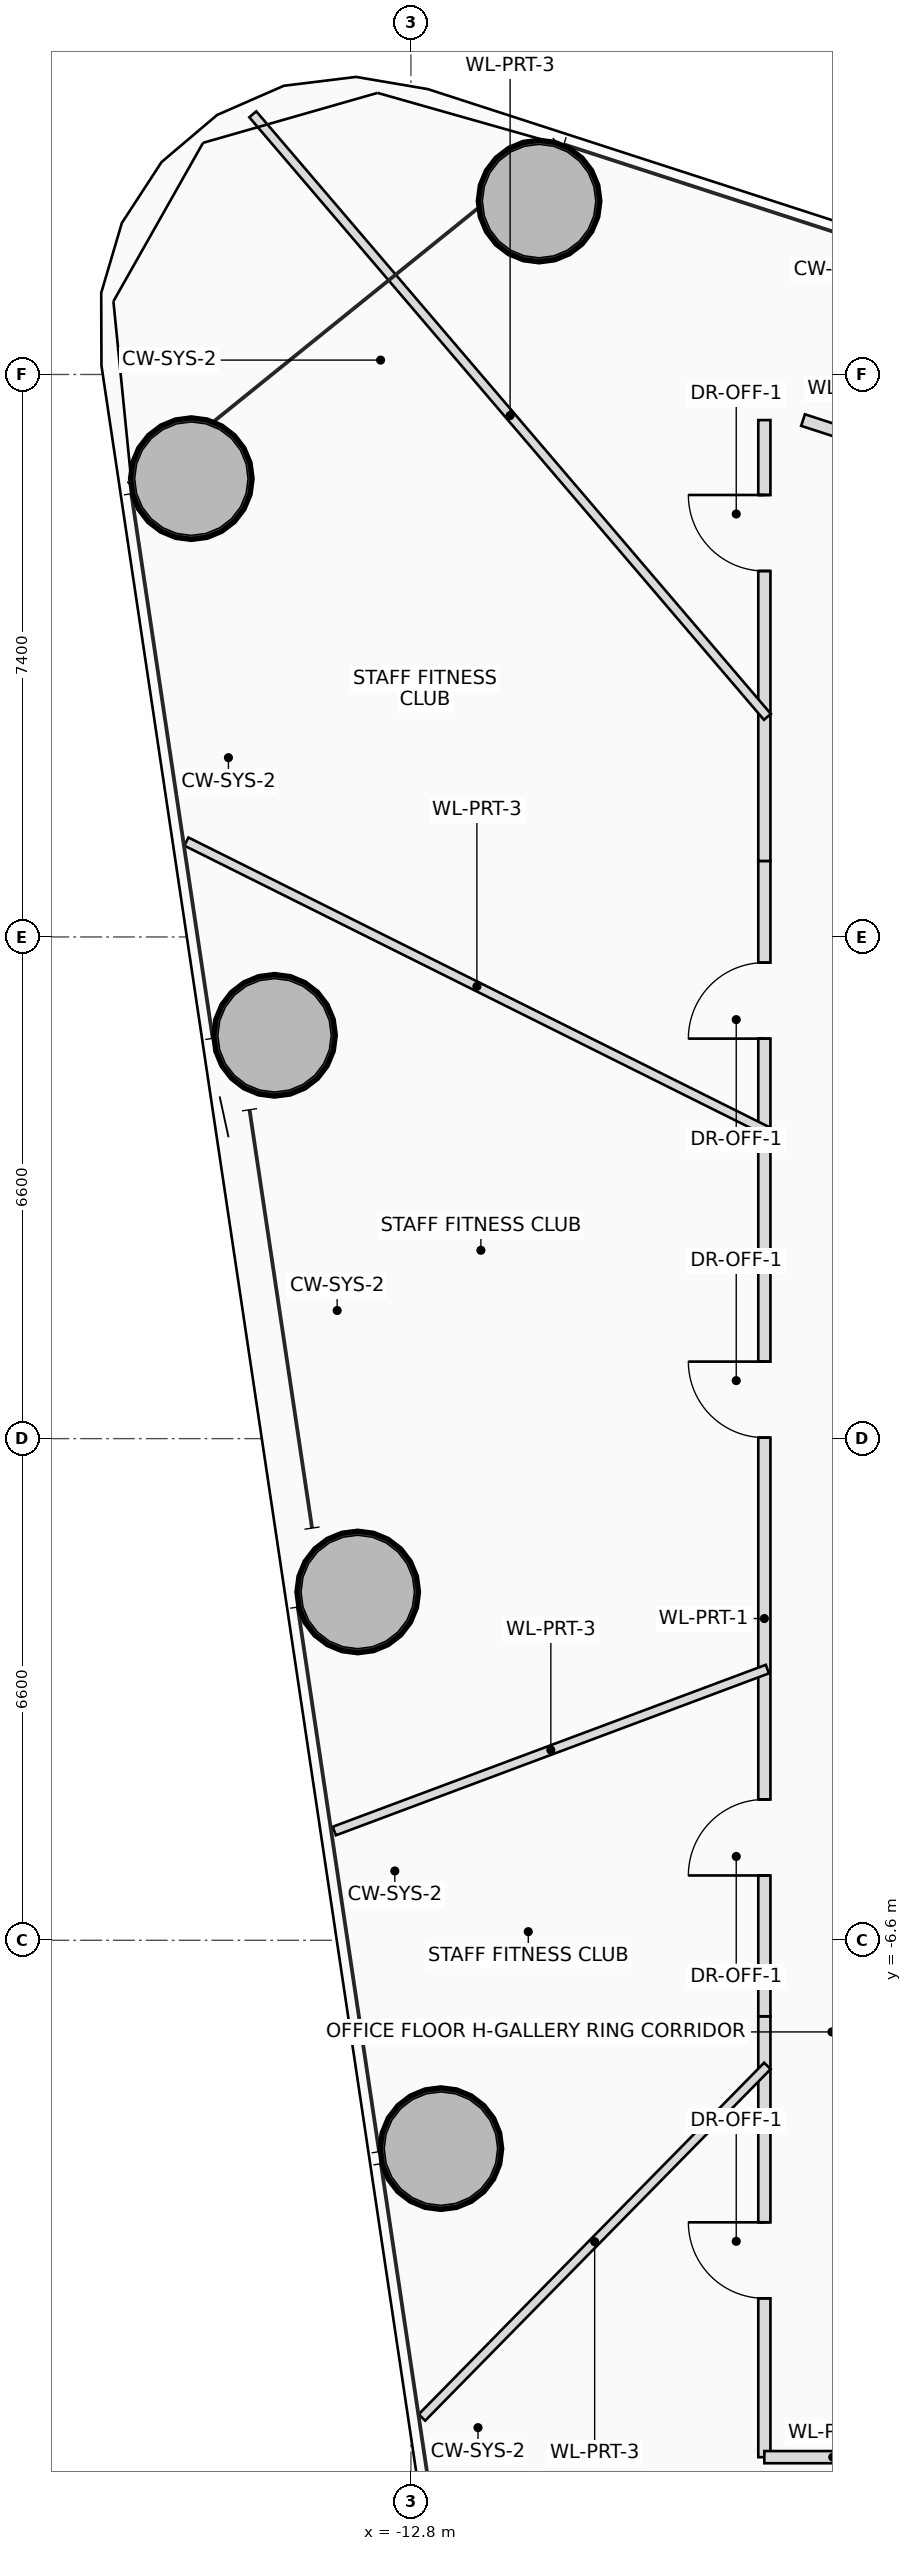
"""IFC4 building model, lengths in metres.
Left out: names, types, materials, properties, quantities, classifications, styles, units other than length and angle.
Written with IfcOpenShell. Run it as: python <this file> out.ifc"""

import sys

from ifc_helpers import new_model, si_unit, direction, frame, frame_2d, origin, origin_2d, place, context, subcontext, project, spatial, rectangle, hollow_circle, extrude, source, transform, mapped, element, fill, save


model = new_model("IFC4")
c1 = context("Model", 3, precision=1e-05, world=origin(), true_north=direction((0.0, 1.0)))
c2 = subcontext(c1, "Body", "Model", "MODEL_VIEW")
j1 = project(units=[si_unit("LENGTHUNIT", "METRE"), si_unit("PLANEANGLEUNIT", "RADIAN")], contexts=[c1])
p1 = place(None, origin())
s1 = spatial("IfcSite", under=j1, at=p1, CompositionType="ELEMENT")
p2 = place(p1, origin())
s2 = spatial("IfcBuilding", under=s1, at=p2, CompositionType="ELEMENT")
p3 = place(p2, frame((0.0, 0.0, 81.05)))
s3 = spatial("IfcBuildingStorey", under=s2, at=p3, CompositionType="ELEMENT", Elevation=81.05)
m1 = source(origin(), c2, "Body", "SweptSolid", [
    extrude(hollow_circle(Radius=0.8, WallThickness=0.055, at=origin_2d()), origin(), (0.0, 0.0, 1.0), 3.75),
])
for number, where, z_axis, x_axis in (
    (1, (-11.114, 16.281, 0.0), (0.0, 0.0, 1.0), (1.0, 0.0, 0.0)),
    (2, (-15.689, 12.629, 0.0), (0.0, 0.0, 1.0), (1.0, 0.0, 0.0)),
    (3, (-14.594, 5.306, 0.0), (0.0, 0.0, 1.0), (1.0, 0.0, 0.0)),
    (4, (-13.5, -2.018, 0.0), (0.0, 0.0, 1.0), (1.0, 0.0, 0.0)),
    (5, (-12.406, -9.341, 0.0), (0.0, 0.0, 1.0), (1.0, 0.0, 0.0)),
):
    element("IfcColumn", number, at=place(p3, frame(where, z_axis=z_axis, x_axis=x_axis)), inside=s3, PredefinedType="COLUMN", context=c2, shape_type="MappedRepresentation", body=[
        mapped(m1, transform((0.0, 0.0, 0.0), scale=1.0)),
    ])
p4 = place(p3, frame((-8.15, -13.4, 0.0), z_axis=(0.0, 0.0, 1.0), x_axis=(0.0, 1.0, 0.0)))
e6 = element("IfcWall", 6, at=p4, inside=s3, PredefinedType="PARTITIONING", context=c2, shape_type="SweptSolid", body=[
    extrude(rectangle(XDim=5.8, YDim=0.16, at=frame_2d((2.9, 0.0))), origin(), (0.0, 0.0, 1.0), 2.815),
])
p5 = place(p4, frame((2.09, 0.0, 0.0)))
e7 = element("IfcOpeningElement", 7, at=p5, cuts=e6, PredefinedType="OPENING", context=c2, shape_type="SweptSolid", body=[
    extrude(rectangle(XDim=1.0, YDim=2.25, at=frame_2d((0.5, 1.125))), frame((0.0, 0.09, 0.0), z_axis=(0.0, -1.0, 0.0), x_axis=(1.0, 0.0, 0.0)), (0.0, 0.0, 1.0), 0.18),
])
p6 = place(p3, frame((-8.15, -7.6, 0.0), z_axis=(0.0, 0.0, 1.0), x_axis=(0.0, 1.0, 0.0)))
e8 = element("IfcWall", 8, at=p6, inside=s3, PredefinedType="PARTITIONING", context=c2, shape_type="SweptSolid", body=[
    extrude(rectangle(XDim=15.2, YDim=0.16, at=frame_2d((7.6, 0.0))), origin(), (0.0, 0.0, 1.0), 2.815),
])
p7 = place(p6, frame((1.853, 0.0, 0.0)))
e9 = element("IfcOpeningElement", 9, at=p7, cuts=e8, PredefinedType="OPENING", context=c2, shape_type="SweptSolid", body=[
    extrude(rectangle(XDim=1.0, YDim=2.25, at=frame_2d((0.5, 1.125))), frame((0.0, 0.09, 0.0), z_axis=(0.0, -1.0, 0.0), x_axis=(1.0, 0.0, 0.0)), (0.0, 0.0, 1.0), 0.18),
])
p8 = place(p6, frame((7.613, 0.0, 0.0)))
e10 = element("IfcOpeningElement", 10, at=p8, cuts=e8, PredefinedType="OPENING", context=c2, shape_type="SweptSolid", body=[
    extrude(rectangle(XDim=1.0, YDim=2.25, at=frame_2d((0.5, 1.125))), frame((0.0, 0.09, 0.0), z_axis=(0.0, -1.0, 0.0), x_axis=(1.0, 0.0, 0.0)), (0.0, 0.0, 1.0), 0.18),
])
p9 = place(p6, frame((12.862, 0.0, 0.0)))
e11 = element("IfcOpeningElement", 11, at=p9, cuts=e8, PredefinedType="OPENING", context=c2, shape_type="SweptSolid", body=[
    extrude(rectangle(XDim=1.0, YDim=2.25, at=frame_2d((0.5, 1.125))), frame((0.0, 0.09, 0.0), z_axis=(0.0, -1.0, 0.0), x_axis=(1.0, 0.0, 0.0)), (0.0, 0.0, 1.0), 0.18),
])
p10 = place(p3, frame((-8.15, 7.6, 0.0), z_axis=(0.0, 0.0, 1.0), x_axis=(0.0, 1.0, 0.0)))
e12 = element("IfcWall", 12, at=p10, inside=s3, PredefinedType="PARTITIONING", context=c2, shape_type="SweptSolid", body=[
    extrude(rectangle(XDim=5.8, YDim=0.16, at=frame_2d((2.9, 0.0))), origin(), (0.0, 0.0, 1.0), 2.815),
])
p11 = place(p10, frame((3.815, 0.0, 0.0)))
e13 = element("IfcOpeningElement", 13, at=p11, cuts=e12, PredefinedType="OPENING", context=c2, shape_type="SweptSolid", body=[
    extrude(rectangle(XDim=1.0, YDim=2.25, at=frame_2d((0.5, 1.125))), frame((0.0, 0.09, 0.0), z_axis=(0.0, -1.0, 0.0), x_axis=(1.0, 0.0, 0.0)), (0.0, 0.0, 1.0), 0.18),
])
p12 = place(p3, frame((-7.641, 13.4, 0.0), z_axis=(0.0, 0.0, 1.0), x_axis=(0.951277022007, -0.308337521884, 0.0)))
e14 = element("IfcWall", 14, at=p12, inside=s3, PredefinedType="PARTITIONING", context=c2, shape_type="SweptSolid", body=[
    extrude(rectangle(XDim=1.357, YDim=0.16, at=frame_2d((0.679, 0.0))), origin(), (0.0, 0.0, 1.0), 3.51),
])
p13 = place(p3, frame((-6.35, -13.4, 0.0), z_axis=(0.0, 0.0, 1.0), x_axis=(-1.0, 0.0, 0.0)))
e15 = element("IfcWall", 15, at=p13, inside=s3, PredefinedType="PARTITIONING", context=c2, shape_type="SweptSolid", body=[
    extrude(rectangle(XDim=1.8, YDim=0.16, at=frame_2d((0.9, 0.0))), origin(), (0.0, 0.0, 1.0), 3.51),
])
p14 = place(p3, frame((-8.11, 9.496, 0.0), z_axis=(0.0, 0.0, 1.0), x_axis=(-0.649436485197, 0.760415841297, 0.0)))
e16 = element("IfcWall", 16, at=p14, inside=s3, PredefinedType="PARTITIONING", context=c2, shape_type="SweptSolid", body=[
    extrude(rectangle(XDim=10.425, YDim=0.12, at=frame_2d((5.213, 0.0))), origin(), (0.0, 0.0, 1.0), 2.815),
])
p15 = place(p3, frame((-8.11, 4.043, 0.0), z_axis=(0.0, 0.0, 1.0), x_axis=(-0.894929683648, 0.44620719551, 0.0)))
e17 = element("IfcWall", 17, at=p15, inside=s3, PredefinedType="PARTITIONING", context=c2, shape_type="SweptSolid", body=[
    extrude(rectangle(XDim=8.542, YDim=0.12, at=frame_2d((4.271, 0.0))), origin(), (0.0, 0.0, 1.0), 2.815),
])
p16 = place(p3, frame((-8.11, -3.032, 0.0), z_axis=(0.0, 0.0, 1.0), x_axis=(-0.936670113357, -0.350212933433, 0.0)))
e18 = element("IfcWall", 18, at=p16, inside=s3, PredefinedType="PARTITIONING", context=c2, shape_type="SweptSolid", body=[
    extrude(rectangle(XDim=6.084, YDim=0.12, at=frame_2d((3.042, 0.0))), origin(), (0.0, 0.0, 1.0), 2.815),
])
p17 = place(p3, frame((-8.11, -8.253, 0.0), z_axis=(0.0, 0.0, 1.0), x_axis=(-0.700886951804, -0.713272374897, 0.0)))
e19 = element("IfcWall", 19, at=p17, inside=s3, PredefinedType="PARTITIONING", context=c2, shape_type="SweptSolid", body=[
    extrude(rectangle(XDim=6.485, YDim=0.12, at=frame_2d((3.243, 0.0))), origin(), (0.0, 0.0, 1.0), 2.975),
])
p18 = place(p5, origin())
e20 = element("IfcDoor", 20, at=p18, inside=s3, OperationType="SINGLE_SWING_RIGHT", PredefinedType="DOOR", context=c2, shape_type="SweptSolid", body=[
    extrude(rectangle(XDim=1.0, YDim=2.25, at=frame_2d((0.5, 1.125))), frame((0.0, 0.025, 0.0), z_axis=(0.0, -1.0, 0.0), x_axis=(1.0, 0.0, 0.0)), (0.0, 0.0, 1.0), 0.05),
])
fill(e7, e20)
p19 = place(p7, origin())
e21 = element("IfcDoor", 21, at=p19, inside=s3, OperationType="SINGLE_SWING_LEFT", PredefinedType="DOOR", context=c2, shape_type="SweptSolid", body=[
    extrude(rectangle(XDim=1.0, YDim=2.25, at=frame_2d((0.5, 1.125))), frame((0.0, 0.025, 0.0), z_axis=(0.0, -1.0, 0.0), x_axis=(1.0, 0.0, 0.0)), (0.0, 0.0, 1.0), 0.05),
])
fill(e9, e21)
p20 = place(p8, origin())
e22 = element("IfcDoor", 22, at=p20, inside=s3, OperationType="SINGLE_SWING_RIGHT", PredefinedType="DOOR", context=c2, shape_type="SweptSolid", body=[
    extrude(rectangle(XDim=1.0, YDim=2.25, at=frame_2d((0.5, 1.125))), frame((0.0, 0.025, 0.0), z_axis=(0.0, -1.0, 0.0), x_axis=(1.0, 0.0, 0.0)), (0.0, 0.0, 1.0), 0.05),
])
fill(e10, e22)
p21 = place(p9, origin())
e23 = element("IfcDoor", 23, at=p21, inside=s3, OperationType="SINGLE_SWING_LEFT", PredefinedType="DOOR", context=c2, shape_type="SweptSolid", body=[
    extrude(rectangle(XDim=1.0, YDim=2.25, at=frame_2d((0.5, 1.125))), frame((0.0, 0.025, 0.0), z_axis=(0.0, -1.0, 0.0), x_axis=(1.0, 0.0, 0.0)), (0.0, 0.0, 1.0), 0.05),
])
fill(e11, e23)
p22 = place(p11, origin())
e24 = element("IfcDoor", 24, at=p22, inside=s3, OperationType="SINGLE_SWING_RIGHT", PredefinedType="DOOR", context=c2, shape_type="SweptSolid", body=[
    extrude(rectangle(XDim=1.0, YDim=2.25, at=frame_2d((0.5, 1.125))), frame((0.0, 0.025, 0.0), z_axis=(0.0, -1.0, 0.0), x_axis=(1.0, 0.0, 0.0)), (0.0, 0.0, 1.0), 0.05),
])
fill(e13, e24)
save(model, sys.argv[1])
